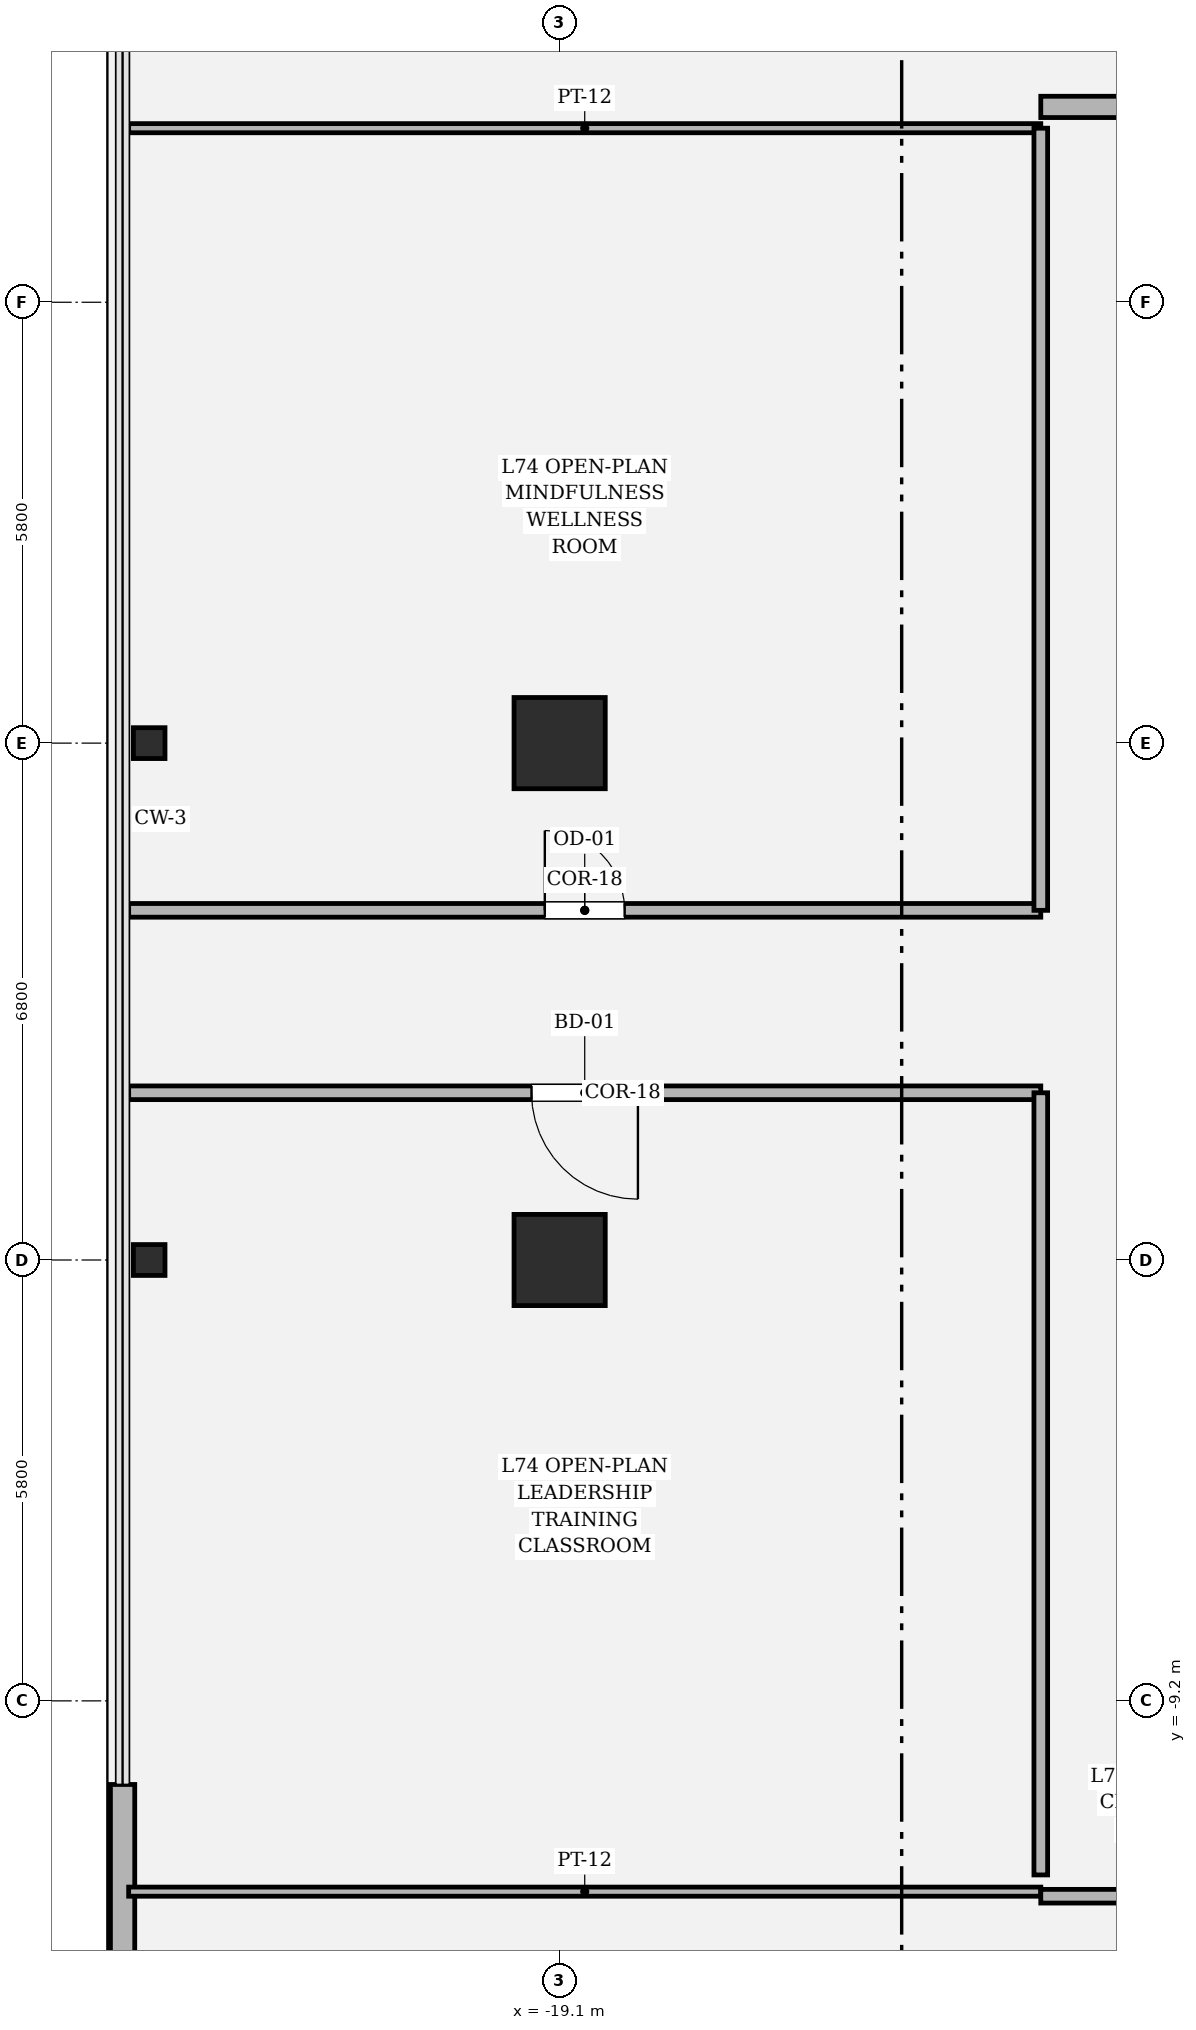
"""IFC4 building model, lengths in metres.
Left out: names, types, materials, properties, quantities, classifications, styles, units other than length and angle.
Written with IfcOpenShell. Run it as: python <this file> out.ifc"""

import sys

from ifc_helpers import new_model, si_unit, direction, frame, frame_2d, origin, origin_2d, place, context, subcontext, project, spatial, rectangle, hollow_rectangle, i_section, extrude, element, fill, save


model = new_model("IFC4")
c1 = context("Model", 3, precision=1e-05, world=origin(), true_north=direction((0.0, 1.0)))
c2 = subcontext(c1, "Body", "Model", "MODEL_VIEW")
j1 = project(units=[si_unit("LENGTHUNIT", "METRE"), si_unit("PLANEANGLEUNIT", "RADIAN")], contexts=[c1])
p1 = place(None, origin())
s1 = spatial("IfcSite", under=j1, at=p1, CompositionType="ELEMENT")
p2 = place(p1, origin())
s2 = spatial("IfcBuilding", under=s1, at=p2, CompositionType="ELEMENT")
p3 = place(p2, frame((0.0, 0.0, 313.2)))
s3 = spatial("IfcBuildingStorey", under=s2, at=p3, CompositionType="ELEMENT", Elevation=313.2)
for number, where, z_axis, x_axis in (
    (1, (-19.1, 3.4, 0.0), (0.0, 0.0, 1.0), (1.0, 0.0, 0.0)),
    (2, (-19.1, -3.4, 0.0), (0.0, 0.0, 1.0), (1.0, 0.0, 0.0)),
):
    element("IfcColumn", number, at=place(p3, frame(where, z_axis=z_axis, x_axis=x_axis)), inside=s3, PredefinedType="COLUMN", context=c2, shape_type="SweptSolid", body=[
        extrude(hollow_rectangle(XDim=1.2, YDim=1.2, WallThickness=0.035, at=origin_2d()), origin(), (0.0, 0.0, 1.0), 4.2),
    ])
for number, where, z_axis, x_axis in (
    (3, (-24.5, -3.4, 0.0), (0.0, 0.0, 1.0), (0.0, 1.0, 0.0)),
    (4, (-24.5, 3.4, 0.0), (0.0, 0.0, 1.0), (0.0, 1.0, 0.0)),
):
    element("IfcColumn", number, at=place(p3, frame(where, z_axis=z_axis, x_axis=x_axis)), inside=s3, PredefinedType="COLUMN", context=c2, shape_type="SweptSolid", body=[
        extrude(i_section(OverallWidth=0.406, OverallDepth=0.416, WebThickness=0.029, FlangeThickness=0.048, FilletRadius=0.018, at=origin_2d()), origin(), (0.0, 0.0, 1.0), 4.198),
    ])
p4 = place(p3, frame((-24.85, -10.3, 0.0), z_axis=(0.0, 0.0, 1.0), x_axis=(0.0, -1.0, 0.0)))
e5 = element("IfcWall", 5, at=p4, inside=s3, PredefinedType="SOLIDWALL", context=c2, shape_type="SweptSolid", body=[
    extrude(rectangle(XDim=5.137, YDim=0.32, at=frame_2d((2.568, 0.0))), origin(), (0.0, 0.0, 1.0), 2.594),
])
p5 = place(p3, frame((-24.77, -11.71, 0.0), z_axis=(0.0, 0.0, 1.0), x_axis=(1.0, 0.0, 0.0)))
e6 = element("IfcWall", 6, at=p5, inside=s3, PredefinedType="PARTITIONING", context=c2, shape_type="SweptSolid", body=[
    extrude(rectangle(XDim=12.0, YDim=0.12, at=frame_2d((6.0, 0.0))), origin(), (0.0, 0.0, 1.0), 2.594),
])
p6 = place(p3, frame((-12.77, -11.77, 0.0), z_axis=(0.0, 0.0, 1.0), x_axis=(1.0, 0.0, 0.0)))
e7 = element("IfcWall", 7, at=p6, inside=s3, PredefinedType="PARTITIONING", context=c2, shape_type="SweptSolid", body=[
    extrude(rectangle(XDim=10.31, YDim=0.18, at=frame_2d((5.155, 0.0))), origin(), (0.0, 0.0, 1.0), 2.594),
])
p7 = place(p6, frame((4.63, 0.0, 0.0)))
e8 = element("IfcOpeningElement", 8, at=p7, cuts=e7, PredefinedType="OPENING", context=c2, shape_type="SweptSolid", body=[
    extrude(rectangle(XDim=1.05, YDim=2.2, at=frame_2d((0.525, 1.1))), frame((0.0, 0.1, 0.0), z_axis=(0.0, -1.0, 0.0), x_axis=(1.0, 0.0, 0.0)), (0.0, 0.0, 1.0), 0.2),
])
p8 = place(p3, frame((-24.77, -1.2, 0.0), z_axis=(0.0, 0.0, 1.0), x_axis=(1.0, 0.0, 0.0)))
e9 = element("IfcWall", 9, at=p8, inside=s3, PredefinedType="PARTITIONING", context=c2, shape_type="SweptSolid", body=[
    extrude(rectangle(XDim=12.0, YDim=0.18, at=frame_2d((6.0, 0.0))), origin(), (0.0, 0.0, 1.0), 2.594),
])
p9 = place(p8, frame((5.3, 0.0, 0.0)))
e10 = element("IfcOpeningElement", 10, at=p9, cuts=e9, PredefinedType="OPENING", context=c2, shape_type="SweptSolid", body=[
    extrude(rectangle(XDim=1.4, YDim=2.25, at=frame_2d((0.7, 1.125))), frame((0.0, 0.1, 0.0), z_axis=(0.0, -1.0, 0.0), x_axis=(1.0, 0.0, 0.0)), (0.0, 0.0, 1.0), 0.2),
])
p10 = place(p3, frame((-12.77, -1.2, 0.0), z_axis=(0.0, 0.0, 1.0), x_axis=(0.0, -1.0, 0.0)))
e11 = element("IfcWall", 11, at=p10, inside=s3, PredefinedType="PARTITIONING", context=c2, shape_type="SweptSolid", body=[
    extrude(rectangle(XDim=10.29, YDim=0.18, at=frame_2d((5.145, 0.0))), origin(), (0.0, 0.0, 1.0), 2.594),
])
p11 = place(p3, frame((-12.77, 1.2, 0.0), z_axis=(0.0, 0.0, 1.0), x_axis=(-1.0, 0.0, 0.0)))
e12 = element("IfcWall", 12, at=p11, inside=s3, PredefinedType="PARTITIONING", context=c2, shape_type="SweptSolid", body=[
    extrude(rectangle(XDim=12.0, YDim=0.18, at=frame_2d((6.0, 0.0))), origin(), (0.0, 0.0, 1.0), 2.594),
])
p12 = place(p11, frame((5.475, 0.0, 0.0)))
e13 = element("IfcOpeningElement", 13, at=p12, cuts=e12, PredefinedType="OPENING", context=c2, shape_type="SweptSolid", body=[
    extrude(rectangle(XDim=1.05, YDim=2.2, at=frame_2d((0.525, 1.1))), frame((0.0, 0.1, 0.0), z_axis=(0.0, -1.0, 0.0), x_axis=(1.0, 0.0, 0.0)), (0.0, 0.0, 1.0), 0.2),
])
p13 = place(p3, frame((-24.77, 11.49, 0.0), z_axis=(0.0, 0.0, 1.0), x_axis=(1.0, 0.0, 0.0)))
e14 = element("IfcWall", 14, at=p13, inside=s3, PredefinedType="PARTITIONING", context=c2, shape_type="SweptSolid", body=[
    extrude(rectangle(XDim=12.0, YDim=0.12, at=frame_2d((6.0, 0.0))), origin(), (0.0, 0.0, 1.0), 2.594),
])
p14 = place(p3, frame((-12.77, 11.49, 0.0), z_axis=(0.0, 0.0, 1.0), x_axis=(0.0, -1.0, 0.0)))
e15 = element("IfcWall", 15, at=p14, inside=s3, PredefinedType="PARTITIONING", context=c2, shape_type="SweptSolid", body=[
    extrude(rectangle(XDim=10.29, YDim=0.18, at=frame_2d((5.145, 0.0))), origin(), (0.0, 0.0, 1.0), 2.594),
])
p15 = place(p3, frame((-2.46, 11.77, 0.0), z_axis=(0.0, 0.0, 1.0), x_axis=(-1.0, 0.0, 0.0)))
e16 = element("IfcWall", 16, at=p15, inside=s3, PredefinedType="SOLIDWALL", context=c2, shape_type="SweptSolid", body=[
    extrude(rectangle(XDim=10.31, YDim=0.28, at=frame_2d((5.155, 0.0))), origin(), (0.0, 0.0, 1.0), 2.594),
])
p16 = place(p15, frame((4.305, 0.0, 0.0)))
e17 = element("IfcOpeningElement", 17, at=p16, cuts=e16, PredefinedType="OPENING", context=c2, shape_type="SweptSolid", body=[
    extrude(rectangle(XDim=1.7, YDim=2.3, at=frame_2d((0.85, 1.15))), frame((0.0, 0.15, 0.0), z_axis=(0.0, -1.0, 0.0), x_axis=(1.0, 0.0, 0.0)), (0.0, 0.0, 1.0), 0.3),
])
p17 = place(p9, origin())
e18 = element("IfcDoor", 18, at=p17, inside=s3, OperationType="SINGLE_SWING_RIGHT", PredefinedType="DOOR", context=c2, shape_type="SweptSolid", body=[
    extrude(rectangle(XDim=1.4, YDim=2.25, at=frame_2d((0.7, 1.125))), frame((0.0, 0.025, 0.0), z_axis=(0.0, -1.0, 0.0), x_axis=(1.0, 0.0, 0.0)), (0.0, 0.0, 1.0), 0.05),
])
fill(e10, e18)
p18 = place(p12, origin())
e19 = element("IfcDoor", 19, at=p18, inside=s3, OperationType="SINGLE_SWING_RIGHT", PredefinedType="DOOR", context=c2, shape_type="SweptSolid", body=[
    extrude(rectangle(XDim=1.05, YDim=2.2, at=frame_2d((0.525, 1.1))), frame((0.0, 0.025, 0.0), z_axis=(0.0, -1.0, 0.0), x_axis=(1.0, 0.0, 0.0)), (0.0, 0.0, 1.0), 0.05),
])
fill(e13, e19)
save(model, sys.argv[1])
